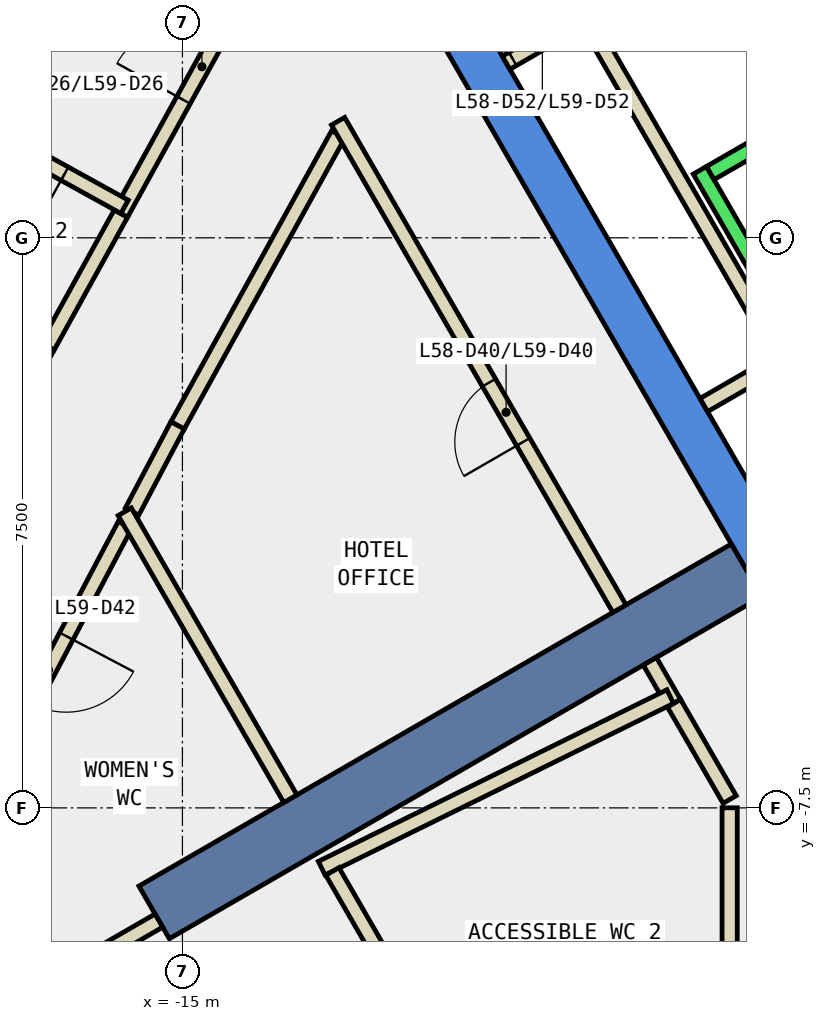
"""IFC4 building model, lengths in metres.
Left out: names, types, materials, properties, quantities, classifications, styles, units other than length and angle.
Written with IfcOpenShell. Run it as: python <this file> out.ifc"""

import sys

from ifc_helpers import new_model, si_unit, direction, frame, frame_2d, origin, place, context, subcontext, project, spatial, polyline, rectangle, outline, extrude, element, fill, save


model = new_model("IFC4")
c1 = context("Model", 3, precision=1e-05, world=origin(), true_north=direction((0.0, 1.0)))
c2 = subcontext(c1, "Body", "Model", "MODEL_VIEW")
j1 = project(units=[si_unit("LENGTHUNIT", "METRE"), si_unit("PLANEANGLEUNIT", "RADIAN")], contexts=[c1])
p1 = place(None, origin())
s1 = spatial("IfcSite", under=j1, at=p1, CompositionType="ELEMENT")
p2 = place(p1, origin())
s2 = spatial("IfcBuilding", under=s1, at=p2, CompositionType="ELEMENT")
p3 = place(p2, frame((0.0, 0.0, 255.8)))
s3 = spatial("IfcBuildingStorey", under=s2, at=p3, CompositionType="ELEMENT", Elevation=255.8)
p4 = place(p3, frame((0.0, 0.0, -0.34)))
e1 = element("IfcWall", 1, at=p4, inside=s3, PredefinedType="SHEAR", context=c2, shape_type="SweptSolid", body=[
    extrude(outline(polyline([(-11.547, 2.5), (-5.774, -7.5), (-5.427, -6.9), (-10.854, 2.5), (-11.547, 2.5)])), origin(), (0.0, 0.0, 1.0), 3.6),
])
p5 = place(p3, frame((-7.578, -4.375, -0.34), z_axis=(0.0, 0.0, 1.0), x_axis=(-0.866024315419, -0.5000018851, 0.0)))
e2 = element("IfcWall", 2, at=p5, inside=s3, PredefinedType="SHEAR", context=c2, shape_type="SweptSolid", body=[
    extrude(rectangle(XDim=9.0, YDim=0.8, at=frame_2d((4.5, 0.0))), origin(), (0.0, 0.0, 1.0), 3.6),
])
p6 = place(p3, frame((-8.532, -6.123, 0.0), z_axis=(0.0, 0.0, 1.0), x_axis=(-0.499977104415, 0.866038622153, 0.0)))
e3 = element("IfcWall", 3, at=p6, inside=s3, PredefinedType="PARTITIONING", context=c2, shape_type="SweptSolid", body=[
    extrude(rectangle(XDim=0.636, YDim=0.2, at=frame_2d((0.318, 0.0))), origin(), (0.0, 0.0, 1.0), 3.26),
])
p7 = place(p3, frame((-12.95, 1.36, 0.0), z_axis=(0.0, 0.0, 1.0), x_axis=(-0.483418231124, -0.875389521194, 0.0)))
e4 = element("IfcWall", 4, at=p7, inside=s3, PredefinedType="PARTITIONING", context=c2, shape_type="SweptSolid", body=[
    extrude(rectangle(XDim=4.373, YDim=0.2, at=frame_2d((2.187, 0.0))), origin(), (0.0, 0.0, 1.0), 3.26),
])
p8 = place(p3, frame((-15.064, -2.468, 0.0), z_axis=(0.0, 0.0, 1.0), x_axis=(-0.467126648849, -0.884190417238, 0.0)))
e5 = element("IfcWall", 5, at=p8, inside=s3, PredefinedType="PARTITIONING", context=c2, shape_type="SweptSolid", body=[
    extrude(rectangle(XDim=1.282, YDim=0.2, at=frame_2d((0.641, 0.0))), origin(), (0.0, 0.0, 1.0), 3.26),
])
p9 = place(p3, frame((-7.8, -7.39, 0.0), z_axis=(0.0, 0.0, 1.0), x_axis=(-0.500266477503, 0.865871498253, 0.0)))
e6 = element("IfcWall", 6, at=p9, inside=s3, PredefinedType="PARTITIONING", context=c2, shape_type="SweptSolid", body=[
    extrude(rectangle(XDim=1.463, YDim=0.2, at=frame_2d((0.731, 0.0))), origin(), (0.0, 0.0, 1.0), 3.26),
])
p10 = place(p3, frame((-15.756, -3.779, 0.0), z_axis=(0.0, 0.0, 1.0), x_axis=(-0.46672043873, -0.884404902786, 0.0)))
e7 = element("IfcWall", 7, at=p10, inside=s3, PredefinedType="PARTITIONING", context=c2, shape_type="SweptSolid", body=[
    extrude(rectangle(XDim=4.307, YDim=0.2, at=frame_2d((2.153, 0.0))), origin(), (0.0, 0.0, 1.0), 3.26),
])
p11 = place(p10, frame((1.653, 0.0, 0.0)))
e8 = element("IfcOpeningElement", 8, at=p11, cuts=e7, PredefinedType="OPENING", context=c2, shape_type="SweptSolid", body=[
    extrude(rectangle(XDim=1.0, YDim=2.1, at=frame_2d((0.5, 1.05))), frame((0.0, 0.11, 0.0), z_axis=(0.0, -1.0, 0.0), x_axis=(1.0, 0.0, 0.0)), (0.0, 0.0, 1.0), 0.22),
])
p12 = place(p3, frame((-15.809, 0.32, 0.0), z_axis=(0.0, 0.0, 1.0), x_axis=(0.483322920175, 0.875442148193, 0.0)))
e9 = element("IfcWall", 9, at=p12, inside=s3, PredefinedType="PARTITIONING", context=c2, shape_type="SweptSolid", body=[
    extrude(rectangle(XDim=4.31, YDim=0.2, at=frame_2d((2.155, 0.0))), origin(), (0.0, 0.0, 1.0), 3.26),
])
p13 = place(p12, frame((1.705, 0.0, 0.0)))
e10 = element("IfcOpeningElement", 10, at=p13, cuts=e9, PredefinedType="OPENING", context=c2, shape_type="SweptSolid", body=[
    extrude(rectangle(XDim=1.0, YDim=2.1, at=frame_2d((0.5, 1.05))), frame((0.0, 0.11, 0.0), z_axis=(0.0, -1.0, 0.0), x_axis=(1.0, 0.0, 0.0)), (0.0, 0.0, 1.0), 0.22),
])
p14 = place(p3, frame((-16.776, -1.43, 0.0), z_axis=(0.0, 0.0, 1.0), x_axis=(0.48360724937, 0.87528511261, 0.0)))
e11 = element("IfcWall", 11, at=p14, inside=s3, PredefinedType="PARTITIONING", context=c2, shape_type="SweptSolid", body=[
    extrude(rectangle(XDim=1.997, YDim=0.2, at=frame_2d((0.999, 0.0))), origin(), (0.0, 0.0, 1.0), 3.26),
])
p15 = place(p3, frame((-17.991, -3.729, 0.0), z_axis=(0.0, 0.0, 1.0), x_axis=(0.466450569784, 0.88454726609, 0.0)))
e12 = element("IfcWall", 12, at=p15, inside=s3, PredefinedType="PARTITIONING", context=c2, shape_type="SweptSolid", body=[
    extrude(rectangle(XDim=2.6, YDim=0.2, at=frame_2d((1.3, 0.0))), origin(), (0.0, 0.0, 1.0), 3.26),
])
p16 = place(p3, frame((-10.741, 2.303, 0.0), z_axis=(0.0, 0.0, 1.0), x_axis=(0.866063652425, 0.499933745558, 0.0)))
e13 = element("IfcWall", 13, at=p16, inside=s3, PredefinedType="PARTITIONING", context=c2, shape_type="SweptSolid", body=[
    extrude(rectangle(XDim=1.1, YDim=0.2, at=frame_2d((0.55, 0.0))), origin(), (0.0, 0.0, 1.0), 3.26),
])
p17 = place(p16, frame((0.1, 0.0, 0.0)))
e14 = element("IfcOpeningElement", 14, at=p17, cuts=e13, PredefinedType="OPENING", context=c2, shape_type="SweptSolid", body=[
    extrude(rectangle(XDim=0.9, YDim=2.1, at=frame_2d((0.45, 1.05))), frame((0.0, 0.11, 0.0), z_axis=(0.0, -1.0, 0.0), x_axis=(1.0, 0.0, 0.0)), (0.0, 0.0, 1.0), 0.22),
])
p18 = place(p3, frame((-9.751, 2.99, 0.0), z_axis=(0.0, 0.0, 1.0), x_axis=(0.499955951776, -0.866050833545, 0.0)))
e15 = element("IfcWall", 15, at=p18, inside=s3, PredefinedType="PARTITIONING", context=c2, shape_type="SweptSolid", body=[
    extrude(rectangle(XDim=5.4, YDim=0.2, at=frame_2d((2.7, 0.0))), origin(), (0.0, 0.0, 1.0), 3.26),
])
p19 = place(p3, frame((-7.188, -1.65, 0.0), z_axis=(0.0, 0.0, 1.0), x_axis=(-0.865841558281, -0.500318294642, 0.0)))
e16 = element("IfcWall", 16, at=p19, inside=s3, PredefinedType="PARTITIONING", context=c2, shape_type="SweptSolid", body=[
    extrude(rectangle(XDim=1.099, YDim=0.2, at=frame_2d((0.55, 0.0))), origin(), (0.0, 0.0, 1.0), 3.26),
])
p20 = place(p3, frame((-7.8, -12.184, 0.0), z_axis=(0.0, 0.0, 1.0), x_axis=(0.0, 1.0, 0.0)))
e17 = element("IfcWall", 17, at=p20, inside=s3, PredefinedType="PARTITIONING", context=c2, shape_type="SweptSolid", body=[
    extrude(rectangle(XDim=4.685, YDim=0.2, at=frame_2d((2.343, 0.0))), origin(), (0.0, 0.0, 1.0), 3.26),
])
p21 = place(p3, frame((-8.582, -6.036, 0.0), z_axis=(0.0, 0.0, 1.0), x_axis=(-0.897105141673, -0.441817116897, 0.0)))
e18 = element("IfcWall", 18, at=p21, inside=s3, PredefinedType="PARTITIONING", context=c2, shape_type="SweptSolid", body=[
    extrude(rectangle(XDim=5.111, YDim=0.2, at=frame_2d((2.555, 0.0))), origin(), (0.0, 0.0, 1.0), 3.26),
])
p22 = place(p3, frame((-13.58, -7.379, 0.0), z_axis=(0.0, 0.0, 1.0), x_axis=(-0.499916403993, 0.866073662582, 0.0)))
e19 = element("IfcWall", 19, at=p22, inside=s3, PredefinedType="PARTITIONING", context=c2, shape_type="SweptSolid", body=[
    extrude(rectangle(XDim=4.359, YDim=0.2, at=frame_2d((2.179, 0.0))), origin(), (0.0, 0.0, 1.0), 3.26),
])
p23 = place(p3, frame((-10.876, -12.062, 0.0), z_axis=(0.0, 0.0, 1.0), x_axis=(-0.499977877545, 0.866038175813, 0.0)))
e20 = element("IfcWall", 20, at=p23, inside=s3, PredefinedType="PARTITIONING", context=c2, shape_type="SweptSolid", body=[
    extrude(rectangle(XDim=4.302, YDim=0.2, at=frame_2d((2.151, 0.0))), origin(), (0.0, 0.0, 1.0), 3.26),
])
p24 = place(p3, frame((-15.31, -8.983, 0.0), z_axis=(0.0, 0.0, 1.0), x_axis=(-0.866047943894, -0.499960957353, 0.0)))
e21 = element("IfcWall", 21, at=p24, inside=s3, PredefinedType="PARTITIONING", context=c2, shape_type="SweptSolid", body=[
    extrude(rectangle(XDim=3.16, YDim=0.2, at=frame_2d((1.58, 0.0))), origin(), (0.0, 0.0, 1.0), 3.26),
])
p25 = place(p3, frame((-15.761, 0.408, 0.0), z_axis=(0.0, 0.0, 1.0), x_axis=(-0.875391622802, 0.483414425445, 0.0)))
e22 = element("IfcWall", 22, at=p25, inside=s3, PredefinedType="PARTITIONING", context=c2, shape_type="SweptSolid", body=[
    extrude(rectangle(XDim=2.699, YDim=0.2, at=frame_2d((1.35, 0.0))), origin(), (0.0, 0.0, 1.0), 3.26),
])
p26 = place(p25, frame((0.9, 0.0, 0.0)))
e23 = element("IfcOpeningElement", 23, at=p26, cuts=e22, PredefinedType="OPENING", context=c2, shape_type="SweptSolid", body=[
    extrude(rectangle(XDim=0.9, YDim=2.1, at=frame_2d((0.45, 1.05))), frame((0.0, 0.11, 0.0), z_axis=(0.0, -1.0, 0.0), x_axis=(1.0, 0.0, 0.0)), (0.0, 0.0, 1.0), 0.22),
])
p27 = place(p3, frame((-9.25, -4.879, 0.0), z_axis=(0.0, 0.0, 1.0), x_axis=(-0.499944124422, 0.866057661161, 0.0)))
e24 = element("IfcWall", 24, at=p27, inside=s3, PredefinedType="PARTITIONING", context=c2, shape_type="SweptSolid", body=[
    extrude(rectangle(XDim=7.405, YDim=0.2, at=frame_2d((3.702, 0.0))), origin(), (0.0, 0.0, 1.0), 3.26),
])
p28 = place(p27, frame((2.533, 0.0, 0.0)))
e25 = element("IfcOpeningElement", 25, at=p28, cuts=e24, PredefinedType="OPENING", context=c2, shape_type="SweptSolid", body=[
    extrude(rectangle(XDim=0.9, YDim=2.1, at=frame_2d((0.45, 1.05))), frame((0.0, 0.11, 0.0), z_axis=(0.0, -1.0, 0.0), x_axis=(1.0, 0.0, 0.0)), (0.0, 0.0, 1.0), 0.22),
])
p29 = place(p3, frame((-8.192, 0.888, 0.0), z_axis=(0.0, 0.0, 1.0), x_axis=(0.500034260056, -0.866005622828, 0.0)))
e26 = element("IfcWall", 26, at=p29, inside=s3, PredefinedType="STANDARD", context=c2, shape_type="SweptSolid", body=[
    extrude(rectangle(XDim=5.399, YDim=0.2, at=frame_2d((2.7, 0.0))), origin(), (0.0, 0.0, 1.0), 3.26),
])
p30 = place(p3, frame((-5.977, 2.052, 0.0), z_axis=(0.0, 0.0, 1.0), x_axis=(-0.865973769406, -0.500089422704, 0.0)))
e27 = element("IfcWall", 27, at=p30, inside=s3, PredefinedType="STANDARD", context=c2, shape_type="SweptSolid", body=[
    extrude(rectangle(XDim=2.399, YDim=0.2, at=frame_2d((1.2, 0.0))), origin(), (0.0, 0.0, 1.0), 3.26),
])
p31 = place(p3, frame((-6.25, 2.01, 0.0), z_axis=(0.0, 0.0, 1.0), x_axis=(-0.86611865017, 0.499838457731, 0.0)))
e28 = element("IfcWall", 28, at=p31, inside=s3, PredefinedType="STANDARD", context=c2, shape_type="SweptSolid", body=[
    extrude(rectangle(XDim=2.733, YDim=0.2, at=frame_2d((1.366, 0.0))), origin(), (0.0, 0.0, 1.0), 3.26),
])
p32 = place(p13, origin())
e29 = element("IfcDoor", 29, at=p32, inside=s3, OperationType="SINGLE_SWING_RIGHT", PredefinedType="DOOR", context=c2, shape_type="SweptSolid", body=[
    extrude(rectangle(XDim=1.0, YDim=2.1, at=frame_2d((0.5, 1.05))), frame((0.0, 0.025, 0.0), z_axis=(0.0, -1.0, 0.0), x_axis=(1.0, 0.0, 0.0)), (0.0, 0.0, 1.0), 0.05),
])
fill(e10, e29)
p33 = place(p26, origin())
e30 = element("IfcDoor", 30, at=p33, inside=s3, OperationType="SINGLE_SWING_LEFT", PredefinedType="DOOR", context=c2, shape_type="SweptSolid", body=[
    extrude(rectangle(XDim=0.9, YDim=2.1, at=frame_2d((0.45, 1.05))), frame((0.0, 0.025, 0.0), z_axis=(0.0, -1.0, 0.0), x_axis=(1.0, 0.0, 0.0)), (0.0, 0.0, 1.0), 0.05),
])
fill(e23, e30)
p34 = place(p28, origin())
e31 = element("IfcDoor", 31, at=p34, inside=s3, OperationType="SINGLE_SWING_RIGHT", PredefinedType="DOOR", context=c2, shape_type="SweptSolid", body=[
    extrude(rectangle(XDim=0.9, YDim=2.1, at=frame_2d((0.45, 1.05))), frame((0.0, 0.025, 0.0), z_axis=(0.0, -1.0, 0.0), x_axis=(1.0, 0.0, 0.0)), (0.0, 0.0, 1.0), 0.05),
])
fill(e25, e31)
p35 = place(p11, origin())
e32 = element("IfcDoor", 32, at=p35, inside=s3, OperationType="SINGLE_SWING_LEFT", PredefinedType="DOOR", context=c2, shape_type="SweptSolid", body=[
    extrude(rectangle(XDim=1.0, YDim=2.1, at=frame_2d((0.5, 1.05))), frame((0.0, 0.025, 0.0), z_axis=(0.0, -1.0, 0.0), x_axis=(1.0, 0.0, 0.0)), (0.0, 0.0, 1.0), 0.05),
])
fill(e8, e32)
p36 = place(p17, origin())
e33 = element("IfcDoor", 33, at=p36, inside=s3, OperationType="SINGLE_SWING_RIGHT", PredefinedType="DOOR", context=c2, shape_type="SweptSolid", body=[
    extrude(rectangle(XDim=0.9, YDim=2.1, at=frame_2d((0.45, 1.05))), frame((0.0, 0.025, 0.0), z_axis=(0.0, -1.0, 0.0), x_axis=(1.0, 0.0, 0.0)), (0.0, 0.0, 1.0), 0.05),
])
fill(e14, e33)
save(model, sys.argv[1])
